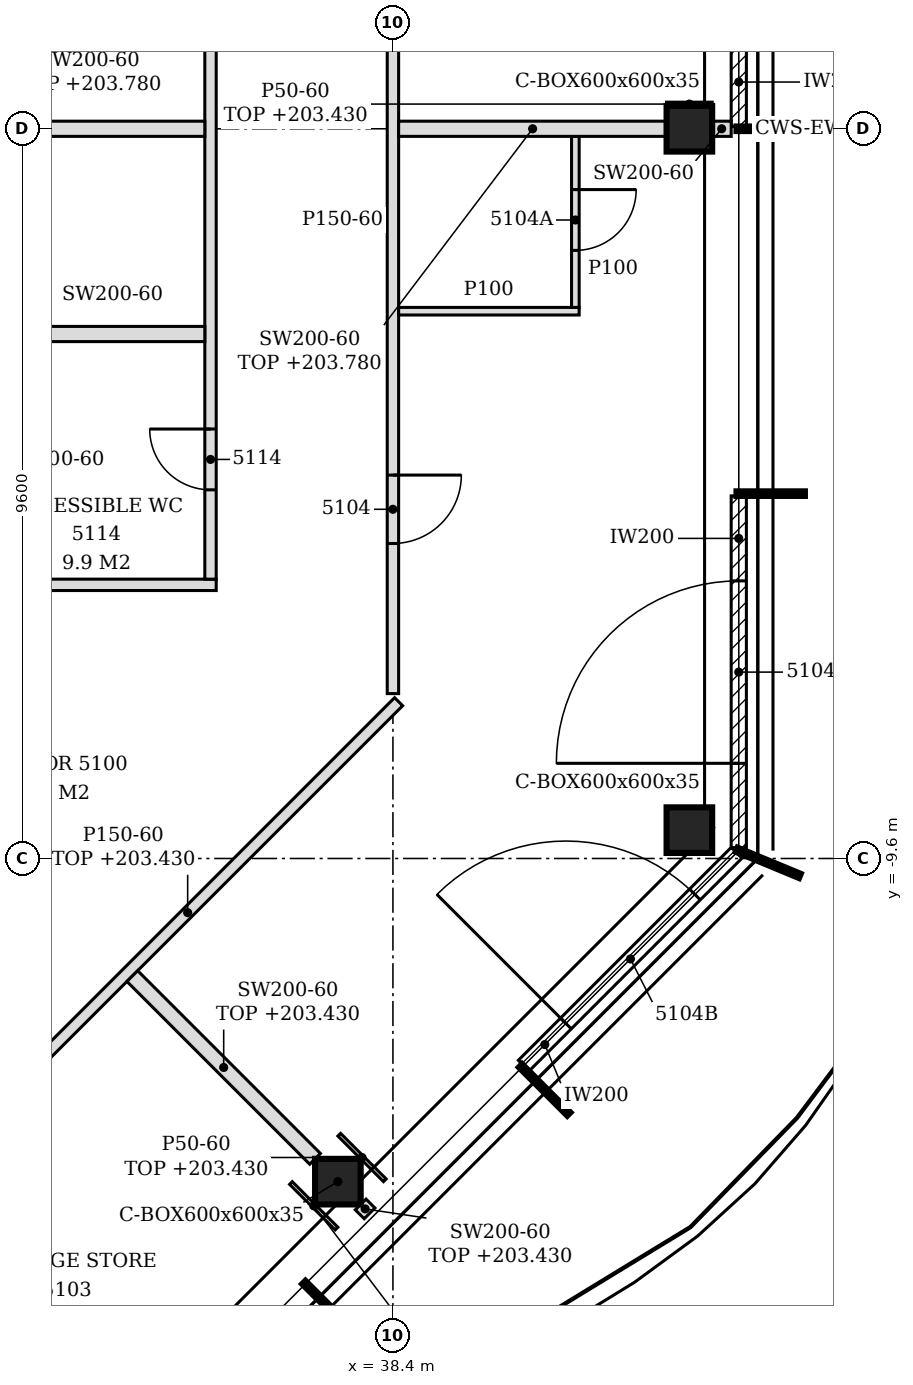
"""IFC4 building model, lengths in metres.
Left out: names, types, materials, properties, quantities, classifications, styles, units other than length and angle.
Written with IfcOpenShell. Run it as: python <this file> out.ifc"""

import sys

from ifc_helpers import new_model, si_unit, direction, frame, frame_2d, origin, origin_2d, place, context, subcontext, project, spatial, polyline, rectangle, hollow_rectangle, outline, extrude, clip, halfspace, element, fill, save


model = new_model("IFC4")
c1 = context("Model", 3, precision=1e-05, world=origin(), true_north=direction((0.0, 1.0)))
c2 = subcontext(c1, "Body", "Model", "MODEL_VIEW")
j1 = project(units=[si_unit("LENGTHUNIT", "METRE"), si_unit("PLANEANGLEUNIT", "RADIAN")], contexts=[c1])
p1 = place(None, origin())
s1 = spatial("IfcSite", under=j1, at=p1, CompositionType="ELEMENT")
p2 = place(p1, origin())
s2 = spatial("IfcBuilding", under=s1, at=p2, CompositionType="ELEMENT")
p3 = place(p2, frame((0.0, 0.0, 201.0)))
s3 = spatial("IfcBuildingStorey", under=s2, at=p3, CompositionType="ELEMENT", Elevation=201.0)
for number, where, z_axis, x_axis in (
    (1, (37.676, -13.852, -0.15), (0.0, 0.0, 1.0), (1.0, 0.0, 0.0)),
    (2, (42.3, -9.227, -0.15), (0.0, 0.0, 1.0), (1.0, 0.0, 0.0)),
):
    element("IfcColumn", number, at=place(p3, frame(where, z_axis=z_axis, x_axis=x_axis)), inside=s3, PredefinedType="COLUMN", context=c2, shape_type="Clipping", body=[
        clip(clip(extrude(hollow_rectangle(XDim=0.6, YDim=0.6, WallThickness=0.035, at=origin_2d()), origin(), (0.0, 0.0, 1.0), 3.5), halfspace(frame((0.0, 0.0, 0.011), z_axis=(0.0, 0.0, 1.0), x_axis=(1.0, 0.0, 0.0)), True)), halfspace(frame((0.0, 0.0, 3.095), z_axis=(0.0, 0.0, 1.0), x_axis=(1.0, 0.0, 0.0)), False)),
    ])
p4 = place(p3, frame((42.3, 0.0, -0.15), z_axis=(0.0, 0.0, 1.0), x_axis=(1.0, 0.0, 0.0)))
e3 = element("IfcColumn", 3, at=p4, inside=s3, PredefinedType="COLUMN", context=c2, shape_type="Clipping", body=[
    clip(extrude(hollow_rectangle(XDim=0.6, YDim=0.6, WallThickness=0.035, at=origin_2d()), origin(), (0.0, 0.0, 1.0), 3.5), halfspace(frame((0.0, 0.0, 0.011), z_axis=(0.0, 0.0, 1.0), x_axis=(1.0, 0.0, 0.0)), True)),
])
p5 = place(p3, frame((40.121, -12.326, 0.0), z_axis=(0.0, 0.0, 1.0), x_axis=(0.707075965734, 0.707137595296, 0.0)))
e4 = element("IfcWall", 4, at=p5, inside=s3, PredefinedType="NOTDEFINED", context=c2, shape_type="SweptSolid", body=[
    extrude(rectangle(XDim=3.961, YDim=0.2, at=frame_2d((1.981, 0.0))), origin(), (0.0, 0.0, 1.0), 3.35),
])
p6 = place(p5, frame((0.786, 0.0, 0.0)))
e5 = element("IfcOpeningElement", 5, at=p6, cuts=e4, PredefinedType="OPENING", context=c2, shape_type="SweptSolid", body=[
    extrude(rectangle(XDim=2.4, YDim=2.4, at=frame_2d((1.2, 1.2))), frame((0.0, 0.11, 0.0), z_axis=(0.0, -1.0, 0.0), x_axis=(1.0, 0.0, 0.0)), (0.0, 0.0, 1.0), 0.22),
])
p7 = place(p3, frame((42.95, -9.457, 0.0), z_axis=(0.0, 0.0, 1.0), x_axis=(0.0, 1.0, 0.0)))
e6 = element("IfcWall", 6, at=p7, inside=s3, PredefinedType="NOTDEFINED", context=c2, shape_type="SweptSolid", body=[
    extrude(rectangle(XDim=4.626, YDim=0.2, at=frame_2d((2.313, 0.0))), origin(), (0.0, 0.0, 1.0), 3.35),
])
p8 = place(p7, frame((1.108, 0.0, 0.0)))
e7 = element("IfcOpeningElement", 7, at=p8, cuts=e6, PredefinedType="OPENING", context=c2, shape_type="SweptSolid", body=[
    extrude(rectangle(XDim=2.4, YDim=2.4, at=frame_2d((1.2, 1.2))), frame((0.0, 0.11, 0.0), z_axis=(0.0, -1.0, 0.0), x_axis=(1.0, 0.0, 0.0)), (0.0, 0.0, 1.0), 0.22),
])
p9 = place(p3, frame((42.95, 0.03, 0.0), z_axis=(0.0, 0.0, 1.0), x_axis=(0.0, 1.0, 0.0)))
e8 = element("IfcWall", 8, at=p9, inside=s3, PredefinedType="NOTDEFINED", context=c2, shape_type="SweptSolid", body=[
    extrude(rectangle(XDim=4.74, YDim=0.2, at=frame_2d((2.37, 0.0))), origin(), (0.0, 0.0, 1.0), 3.35),
])
p10 = place(p9, frame((1.17, 0.0, 0.0)))
e9 = element("IfcOpeningElement", 9, at=p10, cuts=e8, PredefinedType="OPENING", context=c2, shape_type="SweptSolid", body=[
    extrude(rectangle(XDim=2.4, YDim=2.4, at=frame_2d((1.2, 1.2))), frame((0.0, 0.11, 0.0), z_axis=(0.0, -1.0, 0.0), x_axis=(1.0, 0.0, 0.0)), (0.0, 0.0, 1.0), 0.22),
])
p11 = place(p3, frame((30.294, -15.718, 0.0), z_axis=(0.0, 0.0, 1.0), x_axis=(0.707117331948, 0.707096230267, 0.0)))
e10 = element("IfcWall", 10, at=p11, inside=s3, PredefinedType="PARTITIONING", context=c2, shape_type="SweptSolid", body=[
    extrude(rectangle(XDim=11.57, YDim=0.15, at=frame_2d((5.785, 0.0))), origin(), (0.0, 0.0, 1.0), 2.43),
])
p12 = place(p11, frame((2.819, 0.0, 0.0)))
e11 = element("IfcOpeningElement", 11, at=p12, cuts=e10, PredefinedType="OPENING", context=c2, shape_type="SweptSolid", body=[
    extrude(rectangle(XDim=0.9, YDim=2.1, at=frame_2d((0.45, 1.05))), frame((0.0, 0.085, 0.0), z_axis=(0.0, -1.0, 0.0), x_axis=(1.0, 0.0, 0.0)), (0.0, 0.0, 1.0), 0.17),
])
p13 = place(p3, frame((38.093, -14.269, 0.0), z_axis=(0.0, 0.0, 1.0), x_axis=(-0.707106781187, 0.707106781187, 0.0)))
e12 = element("IfcWall", 12, at=p13, inside=s3, PredefinedType="PARTITIONING", context=c2, shape_type="SweptSolid", body=[
    extrude(rectangle(XDim=0.166, YDim=0.2, at=frame_2d((0.083, 0.0))), origin(), (0.0, 0.0, 1.0), 2.43),
])
p14 = place(p3, frame((37.375, -13.552, 0.0), z_axis=(0.0, 0.0, 1.0), x_axis=(-0.707106781187, 0.707106781187, 0.0)))
e13 = element("IfcWall", 13, at=p14, inside=s3, PredefinedType="PARTITIONING", context=c2, shape_type="SweptSolid", body=[
    extrude(rectangle(XDim=3.4, YDim=0.2, at=frame_2d((1.7, 0.0))), origin(), (0.0, 0.0, 1.0), 2.43),
])
p15 = place(p3, frame((38.4, -7.431, 0.0), z_axis=(0.0, 0.0, 1.0), x_axis=(0.0, 1.0, 0.0)))
e14 = element("IfcWall", 14, at=p15, inside=s3, PredefinedType="PARTITIONING", context=c2, shape_type="SweptSolid", body=[
    extrude(outline(polyline([(0.0, 0.0), (15.149, 0.0), (15.149, 3.35), (12.336, 3.35), (12.334, 2.78), (12.126, 2.78), (12.124, 3.35), (7.536, 3.35), (7.534, 2.78), (7.326, 2.78), (7.324, 3.35), (2.736, 3.35), (2.734, 2.78), (2.526, 2.78), (2.524, 3.35), (0.0, 3.35), (0.0, 0.0)])), frame((0.0, 0.075, 0.0), z_axis=(0.0, -1.0, 0.0), x_axis=(1.0, 0.0, 0.0)), (0.0, 0.0, 1.0), 0.15),
])
p16 = place(p15, frame((1.975, 0.0, 0.0)))
e15 = element("IfcOpeningElement", 15, at=p16, cuts=e14, PredefinedType="OPENING", context=c2, shape_type="SweptSolid", body=[
    extrude(rectangle(XDim=0.9, YDim=2.1, at=frame_2d((0.45, 1.05))), frame((0.0, 0.085, 0.0), z_axis=(0.0, -1.0, 0.0), x_axis=(1.0, 0.0, 0.0)), (0.0, 0.0, 1.0), 0.17),
])
p17 = place(p15, frame((9.587, 0.0, 0.0)))
e16 = element("IfcOpeningElement", 16, at=p17, cuts=e14, PredefinedType="OPENING", context=c2, shape_type="SweptSolid", body=[
    extrude(rectangle(XDim=0.9, YDim=2.1, at=frame_2d((0.45, 1.05))), frame((0.0, 0.085, 0.0), z_axis=(0.0, -1.0, 0.0), x_axis=(1.0, 0.0, 0.0)), (0.0, 0.0, 1.0), 0.17),
])
p18 = place(p3, frame((19.125, -6.0, 0.0), z_axis=(0.0, 0.0, 1.0), x_axis=(1.0, 0.0, 0.0)))
e17 = element("IfcWall", 17, at=p18, inside=s3, PredefinedType="PARTITIONING", context=c2, shape_type="SweptSolid", body=[
    extrude(outline(polyline([(0.0, 0.0), (16.95, 0.0), (16.95, 3.35), (12.225, 3.35), (12.223, 2.83), (11.925, 2.83), (11.923, 3.35), (0.226, 3.35), (0.224, 2.322), (0.0, 2.322), (0.0, 0.0)])), frame((0.0, 0.075, 0.0), z_axis=(0.0, -1.0, 0.0), x_axis=(1.0, 0.0, 0.0)), (0.0, 0.0, 1.0), 0.15),
])
p19 = place(p18, frame((6.525, 0.0, 0.0)))
e18 = element("IfcOpeningElement", 18, at=p19, cuts=e17, PredefinedType="OPENING", context=c2, shape_type="SweptSolid", body=[
    extrude(rectangle(XDim=0.9, YDim=2.1, at=frame_2d((0.45, 1.05))), frame((0.0, 0.085, 0.0), z_axis=(0.0, -1.0, 0.0), x_axis=(1.0, 0.0, 0.0)), (0.0, 0.0, 1.0), 0.17),
])
p20 = place(p3, frame((36.0, -5.925, 0.0), z_axis=(0.0, 0.0, 1.0), x_axis=(0.0, 1.0, 0.0)))
e19 = element("IfcWall", 19, at=p20, inside=s3, PredefinedType="PARTITIONING", context=c2, shape_type="SweptSolid", body=[
    extrude(outline(polyline([(0.0, 0.0), (12.649, 0.0), (12.649, 3.35), (10.83, 3.35), (10.828, 2.78), (10.62, 2.78), (10.618, 3.35), (6.03, 3.35), (6.028, 2.78), (5.82, 2.78), (5.818, 3.35), (1.23, 3.35), (1.228, 2.78), (1.02, 2.78), (1.018, 3.35), (0.0, 3.35), (0.0, 0.0)])), frame((0.0, 0.075, 0.0), z_axis=(0.0, -1.0, 0.0), x_axis=(1.0, 0.0, 0.0)), (0.0, 0.0, 1.0), 0.15),
])
p21 = place(p20, frame((1.175, 0.0, 0.0)))
e20 = element("IfcOpeningElement", 20, at=p21, cuts=e19, PredefinedType="OPENING", context=c2, shape_type="SweptSolid", body=[
    extrude(rectangle(XDim=0.8, YDim=2.1, at=frame_2d((0.4, 1.05))), frame((0.0, 0.085, 0.0), z_axis=(0.0, -1.0, 0.0), x_axis=(1.0, 0.0, 0.0)), (0.0, 0.0, 1.0), 0.17),
])
p22 = place(p3, frame((32.9, -2.7, 0.0), z_axis=(0.0, 0.0, 1.0), x_axis=(1.0, 0.0, 0.0)))
e21 = element("IfcWall", 21, at=p22, inside=s3, PredefinedType="PARTITIONING", context=c2, shape_type="SweptSolid", body=[
    extrude(rectangle(XDim=3.025, YDim=0.2, at=frame_2d((1.513, 0.0))), origin(), (0.0, 0.0, 1.0), 3.35),
])
p23 = place(p3, frame((38.475, -2.4, 0.0), z_axis=(0.0, 0.0, 1.0), x_axis=(1.0, 0.0, 0.0)))
e22 = element("IfcWall", 22, at=p23, inside=s3, PredefinedType="PARTITIONING", context=c2, shape_type="SweptSolid", body=[
    extrude(rectangle(XDim=2.375, YDim=0.1, at=frame_2d((1.188, 0.0))), origin(), (0.0, 0.0, 1.0), 3.35),
])
p24 = place(p3, frame((40.8, -2.35, 0.0), z_axis=(0.0, 0.0, 1.0), x_axis=(0.0, 1.0, 0.0)))
e23 = element("IfcWall", 23, at=p24, inside=s3, PredefinedType="PARTITIONING", context=c2, shape_type="SweptSolid", body=[
    extrude(outline(polyline([(0.0, 0.0), (2.25, 0.0), (2.25, 2.78), (2.245, 2.78), (2.243, 3.35), (0.0, 3.35), (0.0, 0.0)])), frame((0.0, 0.05, 0.0), z_axis=(0.0, -1.0, 0.0), x_axis=(1.0, 0.0, 0.0)), (0.0, 0.0, 1.0), 0.1),
])
p25 = place(p24, frame((0.75, 0.0, 0.0)))
e24 = element("IfcOpeningElement", 24, at=p25, cuts=e23, PredefinedType="OPENING", context=c2, shape_type="SweptSolid", body=[
    extrude(rectangle(XDim=0.8, YDim=2.1, at=frame_2d((0.4, 1.05))), frame((0.0, 0.06, 0.0), z_axis=(0.0, -1.0, 0.0), x_axis=(1.0, 0.0, 0.0)), (0.0, 0.0, 1.0), 0.12),
])
p26 = place(p3, frame((31.405, 0.0, 0.0), z_axis=(0.0, 0.0, 1.0), x_axis=(1.0, 0.0, 0.0)))
e25 = element("IfcWall", 25, at=p26, inside=s3, PredefinedType="PARTITIONING", context=c2, shape_type="SweptSolid", body=[
    extrude(rectangle(XDim=4.521, YDim=0.2, at=frame_2d((2.26, 0.0))), origin(), (0.0, 0.0, 1.0), 2.78),
])
p27 = place(p3, frame((38.475, 0.0, 0.0), z_axis=(0.0, 0.0, 1.0), x_axis=(1.0, 0.0, 0.0)))
e26 = element("IfcWall", 26, at=p27, inside=s3, PredefinedType="PARTITIONING", context=c2, shape_type="SweptSolid", body=[
    extrude(outline(polyline([(0.0, 0.0), (3.525, 0.0), (3.525, 2.43), (3.375, 2.43), (3.373, 2.78), (0.0, 2.78), (0.0, 0.0)])), frame((0.0, 0.1, 0.0), z_axis=(0.0, -1.0, 0.0), x_axis=(1.0, 0.0, 0.0)), (0.0, 0.0, 1.0), 0.2),
])
p28 = place(p3, frame((42.6, 0.0, 0.0), z_axis=(0.0, 0.0, 1.0), x_axis=(1.0, 0.0, 0.0)))
e27 = element("IfcWall", 27, at=p28, inside=s3, PredefinedType="PARTITIONING", context=c2, shape_type="SweptSolid", body=[
    extrude(outline(polyline([(0.0, 0.0), (0.25, 0.0), (0.25, 3.35), (0.15, 3.35), (0.148, 2.43), (0.0, 2.43), (0.0, 0.0)])), frame((0.0, 0.1, 0.0), z_axis=(0.0, -1.0, 0.0), x_axis=(1.0, 0.0, 0.0)), (0.0, 0.0, 1.0), 0.2),
])
for number, where, z_axis, x_axis in (
    (28, (37.658, -14.469, 0.0), (0.0, 0.0, 1.0), (-0.707, 0.707, 0.0)),
    (29, (38.293, -13.834, 0.0), (0.0, 0.0, 1.0), (-0.707, 0.707, 0.0)),
):
    element("IfcWall", number, at=place(p3, frame(where, z_axis=z_axis, x_axis=x_axis)), inside=s3, PredefinedType="PARTITIONING", context=c2, shape_type="SweptSolid", body=[
        extrude(rectangle(XDim=0.848, YDim=0.05, at=frame_2d((0.424, 0.0))), origin(), (0.0, 0.0, 1.0), 2.43),
    ])
p29 = place(p3, frame((42.0, 0.325, 0.0), z_axis=(0.0, 0.0, 1.0), x_axis=(1.0, 0.0, 0.0)))
e30 = element("IfcWall", 30, at=p29, inside=s3, PredefinedType="PARTITIONING", context=c2, shape_type="SweptSolid", body=[
    extrude(rectangle(XDim=0.6, YDim=0.05, at=frame_2d((0.3, 0.0))), origin(), (0.0, 0.0, 1.0), 2.43),
])
p30 = place(p6, origin())
e31 = element("IfcDoor", 31, at=p30, inside=s3, OperationType="SINGLE_SWING_LEFT", PredefinedType="DOOR", context=c2, shape_type="SweptSolid", body=[
    extrude(rectangle(XDim=2.4, YDim=2.4, at=frame_2d((1.2, 1.2))), frame((0.0, 0.025, 0.0), z_axis=(0.0, -1.0, 0.0), x_axis=(1.0, 0.0, 0.0)), (0.0, 0.0, 1.0), 0.05),
])
fill(e5, e31)
p31 = place(p8, origin())
e32 = element("IfcDoor", 32, at=p31, inside=s3, OperationType="SINGLE_SWING_LEFT", PredefinedType="DOOR", context=c2, shape_type="SweptSolid", body=[
    extrude(rectangle(XDim=2.4, YDim=2.4, at=frame_2d((1.2, 1.2))), frame((0.0, 0.025, 0.0), z_axis=(0.0, -1.0, 0.0), x_axis=(1.0, 0.0, 0.0)), (0.0, 0.0, 1.0), 0.05),
])
fill(e7, e32)
p32 = place(p16, frame((0.9, 0.0, 0.0), z_axis=(0.0, 0.0, 1.0), x_axis=(-1.0, 0.0, 0.0)))
e33 = element("IfcDoor", 33, at=p32, inside=s3, OperationType="SINGLE_SWING_LEFT", PredefinedType="DOOR", context=c2, shape_type="SweptSolid", body=[
    extrude(rectangle(XDim=0.9, YDim=2.1, at=frame_2d((0.45, 1.05))), frame((0.0, 0.025, 0.0), z_axis=(0.0, -1.0, 0.0), x_axis=(1.0, 0.0, 0.0)), (0.0, 0.0, 1.0), 0.05),
])
fill(e15, e33)
p33 = place(p25, frame((0.8, 0.0, 0.0), z_axis=(0.0, 0.0, 1.0), x_axis=(-1.0, 0.0, 0.0)))
e34 = element("IfcDoor", 34, at=p33, inside=s3, OperationType="SINGLE_SWING_LEFT", PredefinedType="DOOR", context=c2, shape_type="SweptSolid", body=[
    extrude(rectangle(XDim=0.8, YDim=2.1, at=frame_2d((0.4, 1.05))), frame((0.0, 0.025, 0.0), z_axis=(0.0, -1.0, 0.0), x_axis=(1.0, 0.0, 0.0)), (0.0, 0.0, 1.0), 0.05),
])
fill(e24, e34)
p34 = place(p21, origin())
e35 = element("IfcDoor", 35, at=p34, inside=s3, OperationType="SINGLE_SWING_RIGHT", PredefinedType="DOOR", context=c2, shape_type="SweptSolid", body=[
    extrude(rectangle(XDim=0.8, YDim=2.1, at=frame_2d((0.4, 1.05))), frame((0.0, 0.025, 0.0), z_axis=(0.0, -1.0, 0.0), x_axis=(1.0, 0.0, 0.0)), (0.0, 0.0, 1.0), 0.05),
])
fill(e20, e35)
save(model, sys.argv[1])
